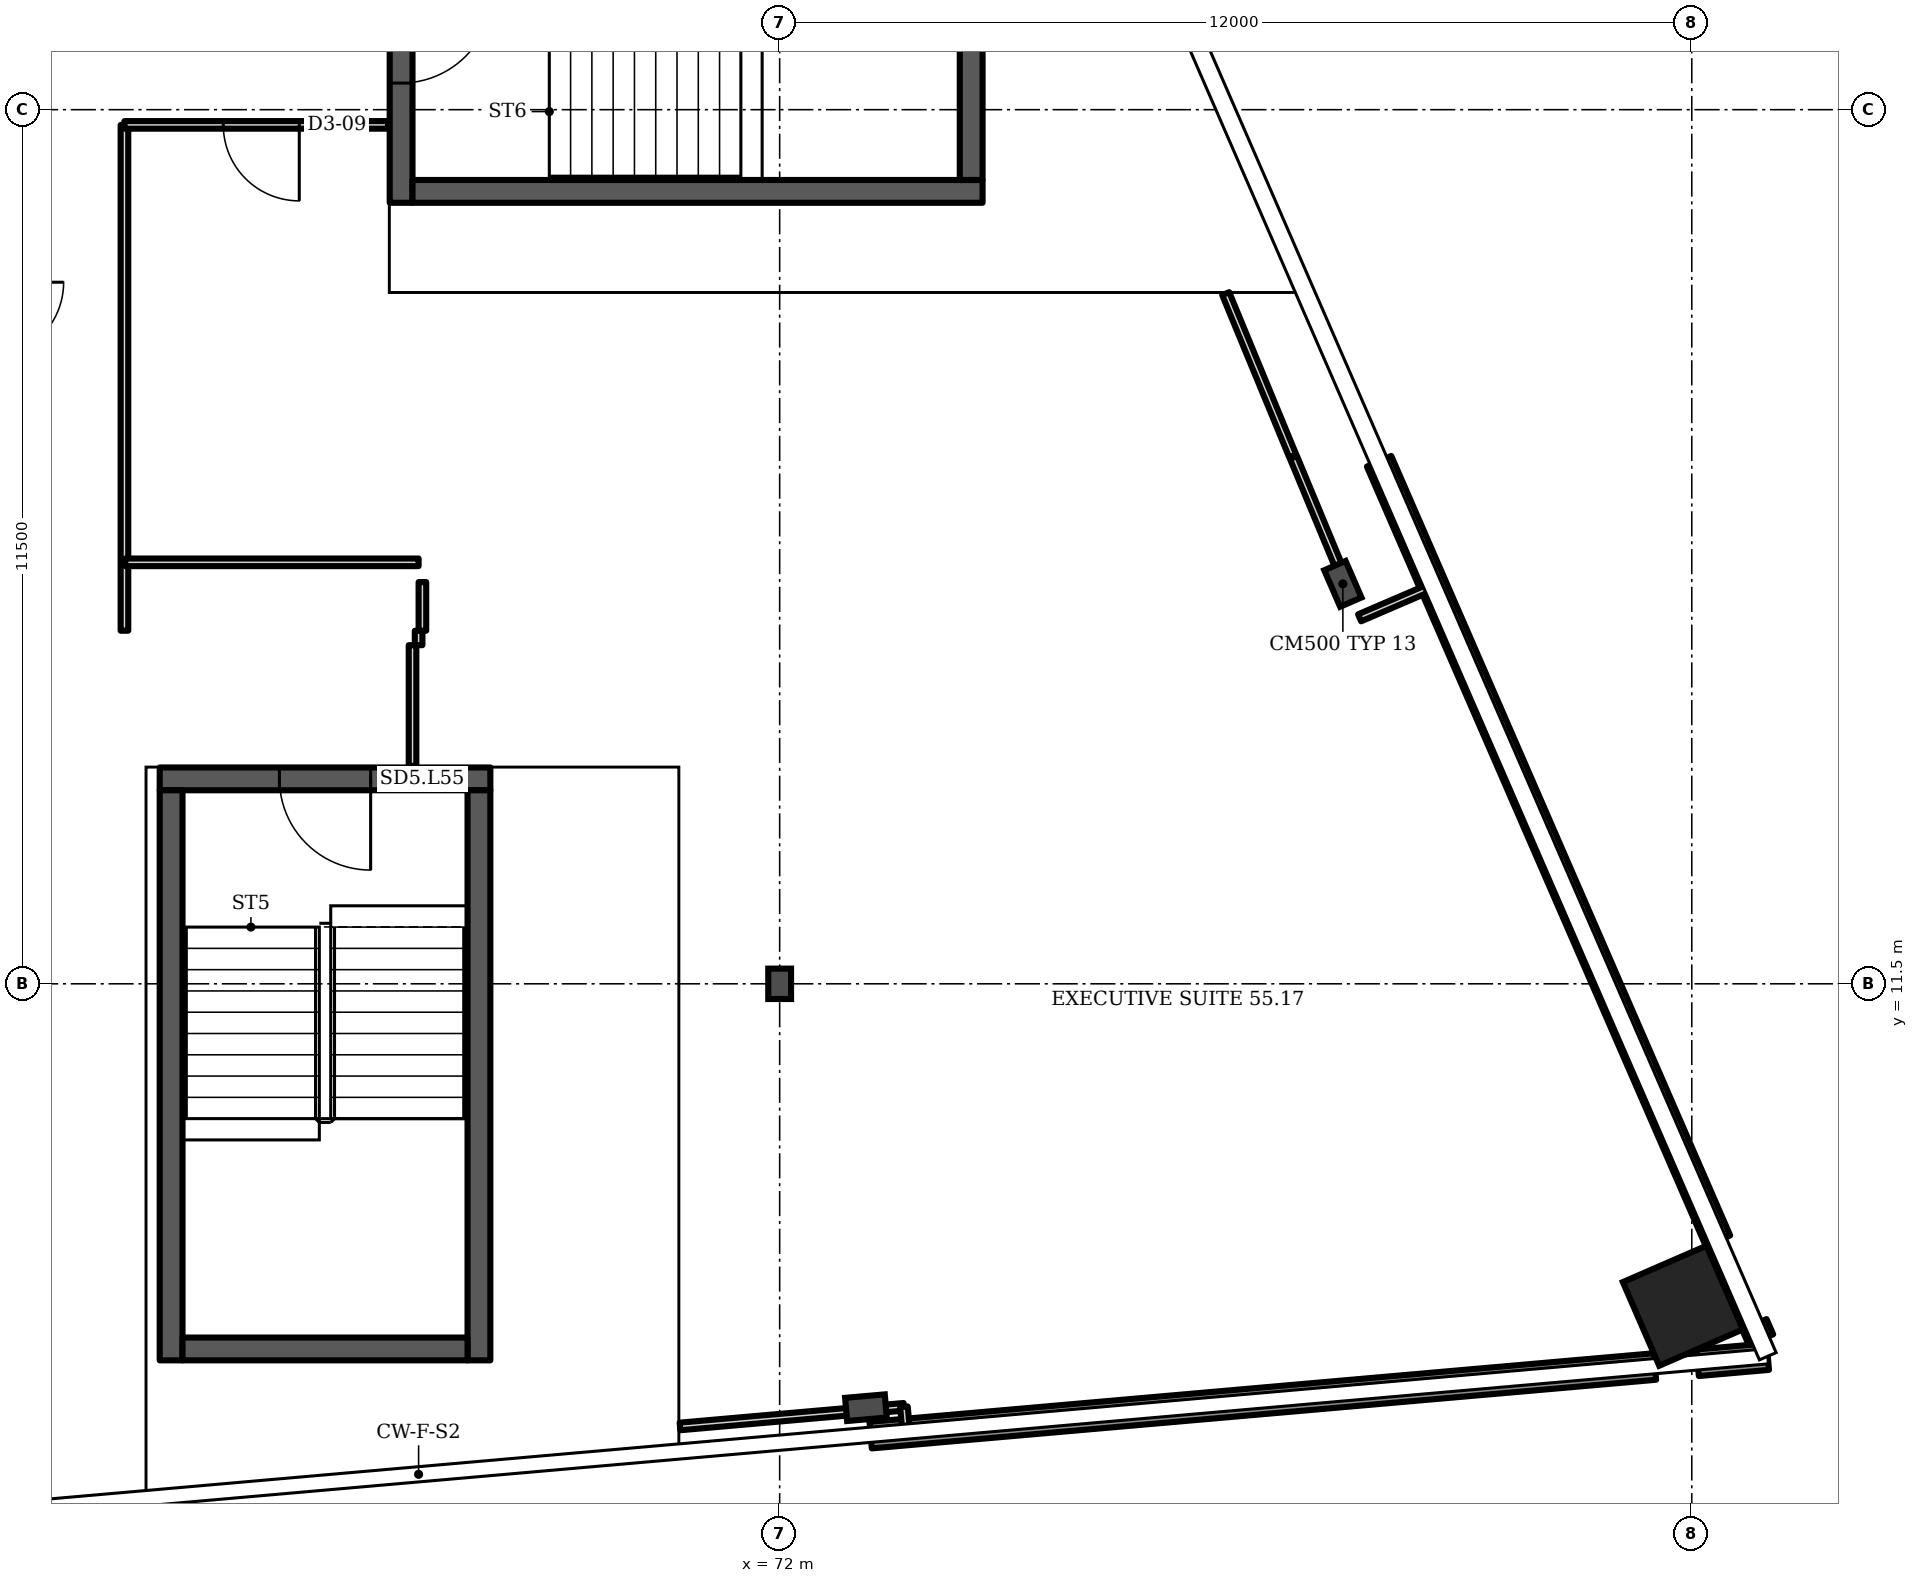
"""IFC4 building model, lengths in metres.
Left out: names, types, materials, properties, quantities, classifications, styles, units other than length and angle.
Written with IfcOpenShell. Run it as: python <this file> out.ifc"""

import sys

from ifc_helpers import new_model, si_unit, direction, frame, frame_2d, origin, origin_2d, place, context, subcontext, project, spatial, rectangle, i_section, extrude, element, fill, save


model = new_model("IFC4")
c1 = context("Model", 3, precision=1e-05, world=origin(), true_north=direction((0.0, 1.0)))
c2 = subcontext(c1, "Body", "Model", "MODEL_VIEW")
j1 = project(units=[si_unit("LENGTHUNIT", "METRE"), si_unit("PLANEANGLEUNIT", "RADIAN")], contexts=[c1])
p1 = place(None, origin())
s1 = spatial("IfcSite", under=j1, at=p1, CompositionType="ELEMENT")
p2 = place(p1, origin())
s2 = spatial("IfcBuilding", under=s1, at=p2, CompositionType="ELEMENT")
p3 = place(p2, frame((0.0, 0.0, 221.5)))
s3 = spatial("IfcBuildingStorey", under=s2, at=p3, CompositionType="ELEMENT", Elevation=221.5)
p4 = place(p3, frame((83.883, 7.265, 0.0), z_axis=(0.0, 0.0, 1.0), x_axis=(-0.398727, 0.917072, 0.0)))
e1 = element("IfcColumn", 1, at=p4, inside=s3, PredefinedType="COLUMN", context=c2, shape_type="SweptSolid", body=[
    extrude(rectangle(XDim=1.2, YDim=1.2, at=origin_2d()), origin(), (0.0, 0.0, 1.0), 3.6),
])
for number, where, z_axis, x_axis in (
    (2, (73.135, 5.923, 0.0), (0.0, 0.0, 1.0), (0.087, -0.996, 0.0)),
    (3, (79.41, 16.762, 0.0), (0.0, 0.0, 1.0), (0.917, 0.399, 0.0)),
):
    element("IfcColumn", number, at=place(p3, frame(where, z_axis=z_axis, x_axis=x_axis)), inside=s3, PredefinedType="COLUMN", context=c2, shape_type="SweptSolid", body=[
        extrude(i_section(OverallWidth=0.306, OverallDepth=0.524, WebThickness=0.021, FlangeThickness=0.04, FilletRadius=0.027, at=origin_2d()), origin(), (0.0, 0.0, 1.0), 3.6),
    ])
p5 = place(p3, frame((72.0, 11.5, 0.0), z_axis=(0.0, 0.0, 1.0), x_axis=(1.0, 0.0, 0.0)))
e4 = element("IfcColumn", 4, at=p5, inside=s3, PredefinedType="COLUMN", context=c2, shape_type="SweptSolid", body=[
    extrude(i_section(OverallWidth=0.3, OverallDepth=0.4, WebThickness=0.013, FlangeThickness=0.024, FilletRadius=0.027, at=origin_2d()), origin(), (0.0, 0.0, 1.0), 3.6),
])
p6 = place(p3, frame((73.197, 5.562, 0.0), z_axis=(0.0, 0.0, 1.0), x_axis=(0.996198, 0.087163, 0.0)))
e5 = element("IfcWall", 5, at=p6, inside=s3, PredefinedType="SOLIDWALL", context=c2, shape_type="SweptSolid", body=[
    extrude(rectangle(XDim=10.358, YDim=0.35, at=frame_2d((5.179, 0.0))), origin(), (0.0, 0.0, 1.0), 1.0),
])
p7 = place(p3, frame((84.078, 6.514, 0.0), z_axis=(0.0, 0.0, 1.0), x_axis=(0.996213, 0.086971, 0.0)))
e6 = element("IfcWall", 6, at=p7, inside=s3, PredefinedType="SOLIDWALL", context=c2, shape_type="SweptSolid", body=[
    extrude(rectangle(XDim=0.926, YDim=0.35, at=frame_2d((0.463, 0.0))), origin(), (0.0, 0.0, 1.0), 1.0),
])
p8 = place(p3, frame((84.91, 6.819, 0.0), z_axis=(0.0, 0.0, 1.0), x_axis=(-0.398359, 0.91723, 0.0)))
e7 = element("IfcWall", 7, at=p8, inside=s3, PredefinedType="SOLIDWALL", context=c2, shape_type="SweptSolid", body=[
    extrude(rectangle(XDim=0.219, YDim=0.35, at=frame_2d((0.109, 0.0))), origin(), (0.0, 0.0, 1.0), 1.0),
])
p9 = place(p3, frame((84.345, 8.12, 0.0), z_axis=(0.0, 0.0, 1.0), x_axis=(-0.398721, 0.917067, 0.0)))
e8 = element("IfcWall", 8, at=p9, inside=s3, PredefinedType="SOLIDWALL", context=c2, shape_type="SweptSolid", body=[
    extrude(rectangle(XDim=11.182, YDim=0.35, at=frame_2d((5.591, 0.0))), origin(), (0.0, 0.0, 1.0), 1.0),
])
p10 = place(p3, frame((63.844, 14.196, 0.0), z_axis=(0.0, 0.0, 1.0), x_axis=(1.0, 0.0, 0.0)))
e9 = element("IfcWall", 9, at=p10, inside=s3, PredefinedType="SHEAR", context=c2, shape_type="SweptSolid", body=[
    extrude(rectangle(XDim=4.35, YDim=0.3, at=frame_2d((2.175, 0.0))), origin(), (0.0, 0.0, 1.0), 3.2),
])
p11 = place(p10, frame((1.575, 0.0, 0.0)))
e10 = element("IfcOpeningElement", 10, at=p11, cuts=e9, PredefinedType="OPENING", context=c2, shape_type="SweptSolid", body=[
    extrude(rectangle(XDim=1.2, YDim=2.1, at=frame_2d((0.6, 1.05))), frame((0.0, 0.16, 0.0), z_axis=(0.0, -1.0, 0.0), x_axis=(1.0, 0.0, 0.0)), (0.0, 0.0, 1.0), 0.32),
])
p12 = place(p3, frame((67.02, 21.775, 0.0), z_axis=(0.0, 0.0, 1.0), x_axis=(0.0, 1.0, 0.0)))
e11 = element("IfcWall", 11, at=p12, inside=s3, PredefinedType="SHEAR", context=c2, shape_type="SweptSolid", body=[
    extrude(rectangle(XDim=4.35, YDim=0.3, at=frame_2d((2.175, 0.0))), origin(), (0.0, 0.0, 1.0), 3.2),
])
p13 = place(p12, frame((1.575, 0.0, 0.0)))
e12 = element("IfcOpeningElement", 12, at=p13, cuts=e11, PredefinedType="OPENING", context=c2, shape_type="SweptSolid", body=[
    extrude(rectangle(XDim=1.2, YDim=2.1, at=frame_2d((0.6, 1.05))), frame((0.0, 0.16, 0.0), z_axis=(0.0, -1.0, 0.0), x_axis=(1.0, 0.0, 0.0)), (0.0, 0.0, 1.0), 0.32),
])
p14 = place(p3, frame((63.38, 16.145, 0.0), z_axis=(0.0, 0.0, 1.0), x_axis=(0.0, 1.0, 0.0)))
e13 = element("IfcWall", 13, at=p14, inside=s3, PredefinedType="PARTITIONING", context=c2, shape_type="SweptSolid", body=[
    extrude(rectangle(XDim=6.655, YDim=0.1, at=frame_2d((3.328, 0.0))), origin(), (0.0, 0.0, 1.0), 3.2),
])
p15 = place(p3, frame((63.38, 22.8, 0.0), z_axis=(0.0, 0.0, 1.0), x_axis=(1.0, 0.0, 0.0)))
e14 = element("IfcWall", 14, at=p15, inside=s3, PredefinedType="PARTITIONING", context=c2, shape_type="SweptSolid", body=[
    extrude(rectangle(XDim=3.47, YDim=0.1, at=frame_2d((1.735, 0.0))), origin(), (0.0, 0.0, 1.0), 3.2),
])
p16 = place(p15, frame((1.3, 0.0, 0.0)))
e15 = element("IfcOpeningElement", 15, at=p16, cuts=e14, PredefinedType="OPENING", context=c2, shape_type="SweptSolid", body=[
    extrude(rectangle(XDim=1.0, YDim=2.1, at=frame_2d((0.5, 1.05))), frame((0.0, 0.06, 0.0), z_axis=(0.0, -1.0, 0.0), x_axis=(1.0, 0.0, 0.0)), (0.0, 0.0, 1.0), 0.12),
])
p17 = place(p3, frame((63.39, 17.045, 0.0), z_axis=(0.0, 0.0, 1.0), x_axis=(1.0, 0.0, 0.0)))
e16 = element("IfcWall", 16, at=p17, inside=s3, PredefinedType="PARTITIONING", context=c2, shape_type="SweptSolid", body=[
    extrude(rectangle(XDim=3.86, YDim=0.1, at=frame_2d((1.93, 0.0))), origin(), (0.0, 0.0, 1.0), 3.2),
])
p18 = place(p3, frame((67.17, 14.366, 0.0), z_axis=(0.0, 0.0, 1.0), x_axis=(0.0, 1.0, 0.0)))
e17 = element("IfcWall", 17, at=p18, inside=s3, PredefinedType="PARTITIONING", context=c2, shape_type="SweptSolid", body=[
    extrude(rectangle(XDim=1.589, YDim=0.1, at=frame_2d((0.794, 0.0))), origin(), (0.0, 0.0, 1.0), 3.2),
])
p19 = place(p3, frame((67.25, 15.955, 0.0), z_axis=(0.0, 0.0, 1.0), x_axis=(0.0, 1.0, 0.0)))
e18 = element("IfcWall", 18, at=p19, inside=s3, PredefinedType="PARTITIONING", context=c2, shape_type="SweptSolid", body=[
    extrude(rectangle(XDim=0.19, YDim=0.1, at=frame_2d((0.095, 0.0))), origin(), (0.0, 0.0, 1.0), 3.2),
])
p20 = place(p3, frame((67.3, 16.145, 0.0), z_axis=(0.0, 0.0, 1.0), x_axis=(0.0, 1.0, 0.0)))
e19 = element("IfcWall", 19, at=p20, inside=s3, PredefinedType="PARTITIONING", context=c2, shape_type="SweptSolid", body=[
    extrude(rectangle(XDim=0.64, YDim=0.1, at=frame_2d((0.32, 0.0))), origin(), (0.0, 0.0, 1.0), 3.2),
])
p21 = place(p3, frame((70.689, 5.677, 0.0), z_axis=(0.0, 0.0, 1.0), x_axis=(0.996174, 0.087417, 0.0)))
e20 = element("IfcWall", 20, at=p21, inside=s3, PredefinedType="PARTITIONING", context=c2, shape_type="SweptSolid", body=[
    extrude(rectangle(XDim=2.958, YDim=0.1, at=frame_2d((1.479, 0.0))), origin(), (0.0, 0.0, 1.0), 2.58),
])
p22 = place(p3, frame((73.663, 5.628, 0.0), z_axis=(0.0, 0.0, 1.0), x_axis=(-0.091893, 0.995772, 0.0)))
e21 = element("IfcWall", 21, at=p22, inside=s3, PredefinedType="PARTITIONING", context=c2, shape_type="SweptSolid", body=[
    extrude(rectangle(XDim=0.308, YDim=0.1, at=frame_2d((0.154, 0.0))), origin(), (0.0, 0.0, 1.0), 3.2),
])
p23 = place(p3, frame((78.75, 18.445, 0.0), z_axis=(0.0, 0.0, 1.0), x_axis=(-0.381663, 0.924299, 0.0)))
e22 = element("IfcWall", 22, at=p23, inside=s3, PredefinedType="PARTITIONING", context=c2, shape_type="SweptSolid", body=[
    extrude(rectangle(XDim=2.31, YDim=0.1, at=frame_2d((1.155, 0.0))), origin(), (0.0, 0.0, 1.0), 3.2),
])
p24 = place(p3, frame((79.35, 17.005, 0.0), z_axis=(0.0, 0.0, 1.0), x_axis=(-0.383703, 0.923459, 0.0)))
e23 = element("IfcWall", 23, at=p24, inside=s3, PredefinedType="PARTITIONING", context=c2, shape_type="SweptSolid", body=[
    extrude(rectangle(XDim=1.538, YDim=0.1, at=frame_2d((0.769, 0.0))), origin(), (0.0, 0.0, 1.0), 3.2),
])
p25 = place(p3, frame((79.63, 16.315, 0.0), z_axis=(0.0, 0.0, 1.0), x_axis=(0.918616, 0.395147, 0.0)))
e24 = element("IfcWall", 24, at=p25, inside=s3, PredefinedType="PARTITIONING", context=c2, shape_type="SweptSolid", body=[
    extrude(rectangle(XDim=1.031, YDim=0.1, at=frame_2d((0.516, 0.0))), origin(), (0.0, 0.0, 1.0), 2.58),
])
for number, where, z_axis, x_axis in (
    (25, (63.994, 6.546, 0.0), (0.0, 0.0, 1.0), (0.0, 1.0, 0.0)),
    (26, (68.044, 6.546, 0.0), (0.0, 0.0, 1.0), (0.0, 1.0, 0.0)),
):
    element("IfcWall", number, at=place(p3, frame(where, z_axis=z_axis, x_axis=x_axis)), inside=s3, PredefinedType="SHEAR", context=c2, shape_type="SweptSolid", body=[
        extrude(rectangle(XDim=7.5, YDim=0.3, at=frame_2d((3.75, 0.0))), origin(), (0.0, 0.0, 1.0), 3.2),
    ])
p26 = place(p3, frame((64.144, 6.696, 0.0), z_axis=(0.0, 0.0, 1.0), x_axis=(1.0, 0.0, 0.0)))
e27 = element("IfcWall", 27, at=p26, inside=s3, PredefinedType="SHEAR", context=c2, shape_type="SweptSolid", body=[
    extrude(rectangle(XDim=3.75, YDim=0.3, at=frame_2d((1.875, 0.0))), origin(), (0.0, 0.0, 1.0), 3.2),
])
p27 = place(p3, frame((67.17, 21.925, 0.0), z_axis=(0.0, 0.0, 1.0), x_axis=(1.0, 0.0, 0.0)))
e28 = element("IfcWall", 28, at=p27, inside=s3, PredefinedType="SHEAR", context=c2, shape_type="SweptSolid", body=[
    extrude(rectangle(XDim=7.5, YDim=0.3, at=frame_2d((3.75, 0.0))), origin(), (0.0, 0.0, 1.0), 3.2),
])
p28 = place(p3, frame((74.52, 22.075, 0.0), z_axis=(0.0, 0.0, 1.0), x_axis=(0.0, 1.0, 0.0)))
e29 = element("IfcWall", 29, at=p28, inside=s3, PredefinedType="SHEAR", context=c2, shape_type="SweptSolid", body=[
    extrude(rectangle(XDim=3.75, YDim=0.3, at=frame_2d((1.875, 0.0))), origin(), (0.0, 0.0, 1.0), 3.2),
])
p29 = place(p11, origin())
e30 = element("IfcDoor", 30, at=p29, inside=s3, OperationType="SINGLE_SWING_RIGHT", PredefinedType="DOOR", context=c2, shape_type="SweptSolid", body=[
    extrude(rectangle(XDim=1.2, YDim=2.1, at=frame_2d((0.6, 1.05))), frame((0.0, 0.025, 0.0), z_axis=(0.0, -1.0, 0.0), x_axis=(1.0, 0.0, 0.0)), (0.0, 0.0, 1.0), 0.05),
])
fill(e10, e30)
p30 = place(p13, origin())
e31 = element("IfcDoor", 31, at=p30, inside=s3, OperationType="SINGLE_SWING_RIGHT", PredefinedType="DOOR", context=c2, shape_type="SweptSolid", body=[
    extrude(rectangle(XDim=1.2, YDim=2.1, at=frame_2d((0.6, 1.05))), frame((0.0, 0.025, 0.0), z_axis=(0.0, -1.0, 0.0), x_axis=(1.0, 0.0, 0.0)), (0.0, 0.0, 1.0), 0.05),
])
fill(e12, e31)
p31 = place(p16, origin())
e32 = element("IfcDoor", 32, at=p31, inside=s3, OperationType="SINGLE_SWING_RIGHT", PredefinedType="DOOR", context=c2, shape_type="SweptSolid", body=[
    extrude(rectangle(XDim=1.0, YDim=2.1, at=frame_2d((0.5, 1.05))), frame((0.0, 0.025, 0.0), z_axis=(0.0, -1.0, 0.0), x_axis=(1.0, 0.0, 0.0)), (0.0, 0.0, 1.0), 0.05),
])
fill(e15, e32)
save(model, sys.argv[1])
